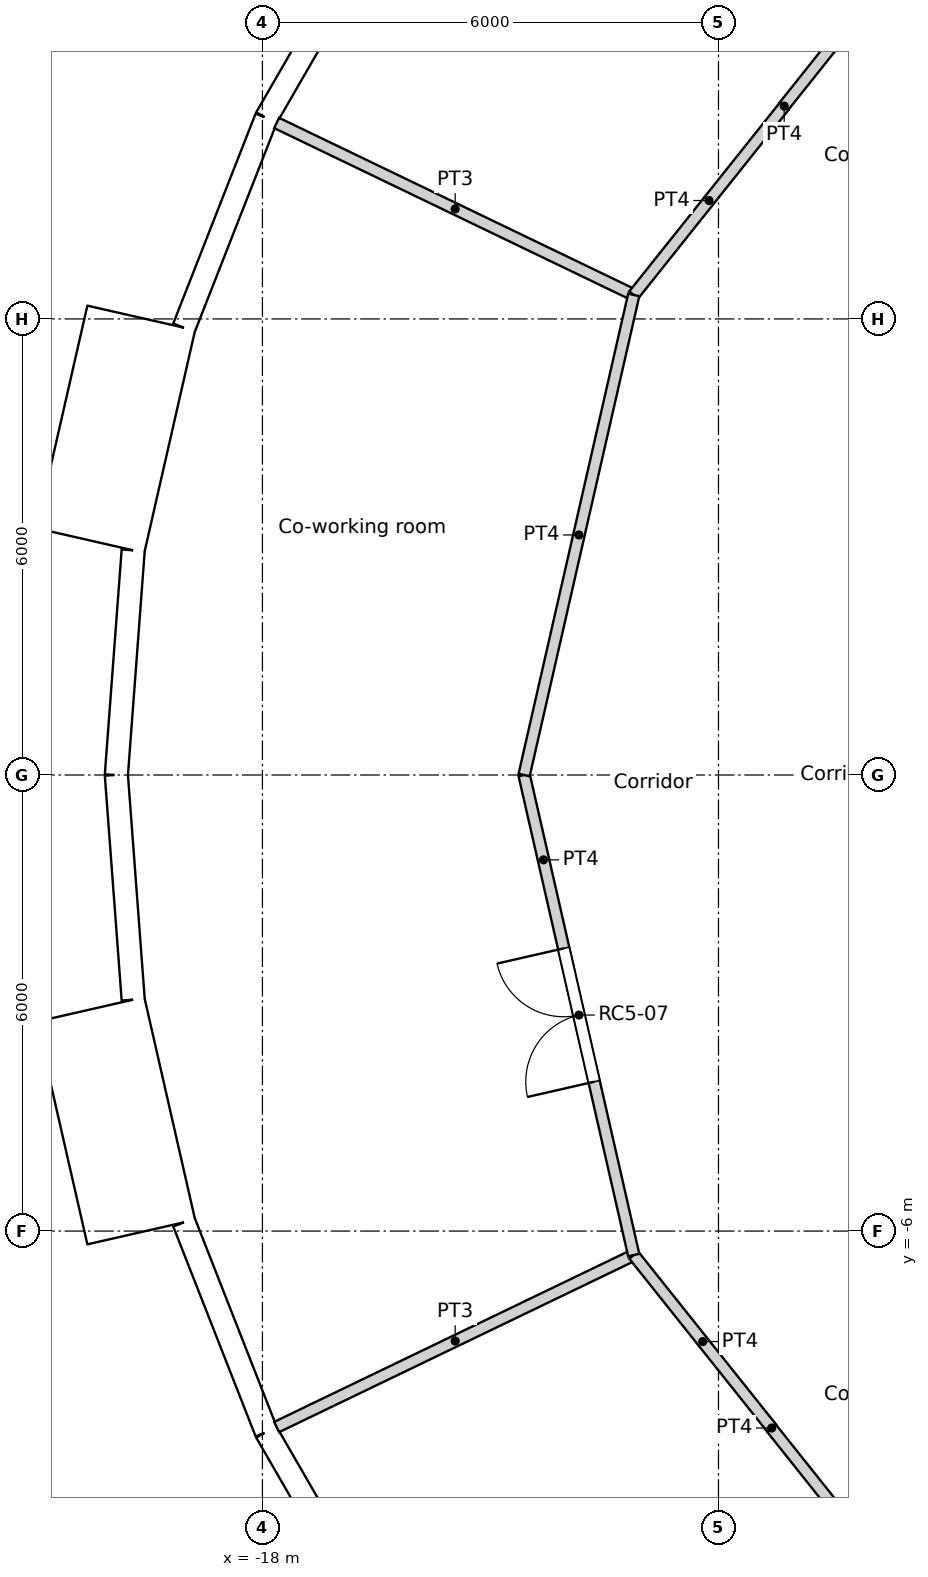
"""IFC4 building model, lengths in metres.
Left out: names, types, materials, properties, quantities, classifications, styles, units other than length and angle.
Written with IfcOpenShell. Run it as: python <this file> out.ifc"""

import sys

from ifc_helpers import new_model, si_unit, direction, frame, frame_2d, origin, origin_2d, place, context, subcontext, project, spatial, rectangle, circle, extrude, element, fill, save


model = new_model("IFC4")
c1 = context("Model", 3, precision=1e-05, world=origin(), true_north=direction((0.0, 1.0)))
c2 = subcontext(c1, "Body", "Model", "MODEL_VIEW")
j1 = project(units=[si_unit("LENGTHUNIT", "METRE"), si_unit("PLANEANGLEUNIT", "RADIAN")], contexts=[c1])
p1 = place(None, origin())
s1 = spatial("IfcSite", under=j1, at=p1, CompositionType="ELEMENT")
p2 = place(p1, origin())
s2 = spatial("IfcBuilding", under=s1, at=p2, CompositionType="ELEMENT")
p3 = place(p2, frame((0.0, 0.0, 270.6)))
s3 = spatial("IfcBuildingStorey", under=s2, at=p3, CompositionType="ELEMENT", Elevation=270.6)
for number, where, z_axis, x_axis in (
    (1, (-16.958, 8.167, 0.0), (0.0, 0.0, 1.0), (1.0, 0.0, 0.0)),
    (2, (-18.612, 2.805, 0.0), (0.0, 0.0, 1.0), (1.0, 0.0, 0.0)),
    (3, (-18.612, -2.805, 0.0), (0.0, 0.0, 1.0), (1.0, 0.0, 0.0)),
    (4, (-16.958, -8.167, 0.0), (0.0, 0.0, 1.0), (1.0, 0.0, 0.0)),
):
    element("IfcColumn", number, at=place(p3, frame(where, z_axis=z_axis, x_axis=x_axis)), inside=s3, PredefinedType="COLUMN", context=c2, shape_type="SweptSolid", body=[
        extrude(circle(Radius=0.55, at=origin_2d()), origin(), (0.0, 0.0, 1.0), 3.6),
    ])
p4 = place(p3, frame((-16.468, 11.209, 0.0), z_axis=(0.0, 0.0, 1.0), x_axis=(-0.500012570604, -0.866018146021, 0.0)))
e5 = element("IfcWall", 5, at=p4, inside=s3, PredefinedType="SOLIDWALL", context=c2, shape_type="SweptSolid", body=[
    extrude(rectangle(XDim=2.962, YDim=0.3, at=frame_2d((1.481, 0.0))), origin(), (0.0, 0.0, 1.0), 3.25),
])
p5 = place(p4, frame((1.481, 0.0, 1.55)))
e6 = element("IfcOpeningElement", 6, at=p5, cuts=e5, PredefinedType="OPENING", context=c2, shape_type="SweptSolid", body=[
    extrude(circle(Radius=0.9, at=origin_2d()), frame((0.0, 0.16, 0.0), z_axis=(0.0, -1.0, 0.0), x_axis=(1.0, 0.0, 0.0)), (0.0, 0.0, 1.0), 0.32),
])
p6 = place(p3, frame((-17.949, 8.644, 0.0), z_axis=(0.0, 0.0, 1.0), x_axis=(-0.365343821297, -0.930872650925, 0.0)))
e7 = element("IfcWall", 7, at=p6, inside=s3, PredefinedType="SOLIDWALL", context=c2, shape_type="SweptSolid", body=[
    extrude(rectangle(XDim=2.962, YDim=0.3, at=frame_2d((1.481, 0.0))), origin(), (0.0, 0.0, 1.0), 3.25),
])
p7 = place(p6, frame((1.481, 0.0, 1.55)))
e8 = element("IfcOpeningElement", 8, at=p7, cuts=e7, PredefinedType="OPENING", context=c2, shape_type="SweptSolid", body=[
    extrude(circle(Radius=0.9, at=origin_2d()), frame((0.0, 0.16, 0.0), z_axis=(0.0, -1.0, 0.0), x_axis=(1.0, 0.0, 0.0)), (0.0, 0.0, 1.0), 0.32),
])
p8 = place(p3, frame((-19.595, 6.011, -0.35), z_axis=(0.0, 0.0, 1.0), x_axis=(-0.222570682856, -0.974916555985, 0.0)))
e9 = element("IfcWall", 9, at=p8, inside=s3, PredefinedType="ELEMENTEDWALL", context=c2, shape_type="SweptSolid", body=[
    extrude(rectangle(XDim=3.0, YDim=1.45, at=frame_2d((1.5, 0.0))), origin(), (0.0, 0.0, 1.0), 3.6),
])
p9 = place(p8, frame((1.5, 0.0, 1.9)))
e10 = element("IfcOpeningElement", 10, at=p9, cuts=e9, PredefinedType="OPENING", context=c2, shape_type="SweptSolid", body=[
    extrude(circle(Radius=0.9, at=origin_2d()), frame((0.0, 0.735, 0.0), z_axis=(0.0, -1.0, 0.0), x_axis=(1.0, 0.0, 0.0)), (0.0, 0.0, 1.0), 1.47),
])
p10 = place(p3, frame((-19.7, 2.954, 0.0), z_axis=(0.0, 0.0, 1.0), x_axis=(-0.074755115547, -0.997201921729, 0.0)))
e11 = element("IfcWall", 11, at=p10, inside=s3, PredefinedType="SOLIDWALL", context=c2, shape_type="SweptSolid", body=[
    extrude(rectangle(XDim=2.962, YDim=0.3, at=frame_2d((1.481, 0.0))), origin(), (0.0, 0.0, 1.0), 3.25),
])
p11 = place(p10, frame((1.481, 0.0, 1.55)))
e12 = element("IfcOpeningElement", 12, at=p11, cuts=e11, PredefinedType="OPENING", context=c2, shape_type="SweptSolid", body=[
    extrude(circle(Radius=0.9, at=origin_2d()), frame((0.0, 0.16, 0.0), z_axis=(0.0, -1.0, 0.0), x_axis=(1.0, 0.0, 0.0)), (0.0, 0.0, 1.0), 0.32),
])
p12 = place(p3, frame((-19.922, 0.0, 0.0), z_axis=(0.0, 0.0, 1.0), x_axis=(0.074755115547, -0.997201921729, 0.0)))
e13 = element("IfcWall", 13, at=p12, inside=s3, PredefinedType="SOLIDWALL", context=c2, shape_type="SweptSolid", body=[
    extrude(rectangle(XDim=2.962, YDim=0.3, at=frame_2d((1.481, 0.0))), origin(), (0.0, 0.0, 1.0), 3.25),
])
p13 = place(p12, frame((1.481, 0.0, 1.55)))
e14 = element("IfcOpeningElement", 14, at=p13, cuts=e13, PredefinedType="OPENING", context=c2, shape_type="SweptSolid", body=[
    extrude(circle(Radius=0.9, at=origin_2d()), frame((0.0, 0.16, 0.0), z_axis=(0.0, -1.0, 0.0), x_axis=(1.0, 0.0, 0.0)), (0.0, 0.0, 1.0), 0.32),
])
p14 = place(p3, frame((-20.262, -3.086, -0.35), z_axis=(0.0, 0.0, 1.0), x_axis=(0.222570682856, -0.974916555985, 0.0)))
e15 = element("IfcWall", 15, at=p14, inside=s3, PredefinedType="ELEMENTEDWALL", context=c2, shape_type="SweptSolid", body=[
    extrude(rectangle(XDim=3.0, YDim=1.45, at=frame_2d((1.5, 0.0))), origin(), (0.0, 0.0, 1.0), 3.6),
])
p15 = place(p14, frame((1.5, 0.0, 1.9)))
e16 = element("IfcOpeningElement", 16, at=p15, cuts=e15, PredefinedType="OPENING", context=c2, shape_type="SweptSolid", body=[
    extrude(circle(Radius=0.9, at=origin_2d()), frame((0.0, 0.735, 0.0), z_axis=(0.0, -1.0, 0.0), x_axis=(1.0, 0.0, 0.0)), (0.0, 0.0, 1.0), 1.47),
])
p16 = place(p3, frame((-19.031, -5.886, 0.0), z_axis=(0.0, 0.0, 1.0), x_axis=(0.365343821297, -0.930872650925, 0.0)))
e17 = element("IfcWall", 17, at=p16, inside=s3, PredefinedType="SOLIDWALL", context=c2, shape_type="SweptSolid", body=[
    extrude(rectangle(XDim=2.962, YDim=0.3, at=frame_2d((1.481, 0.0))), origin(), (0.0, 0.0, 1.0), 3.25),
])
p17 = place(p16, frame((1.481, 0.0, 1.55)))
e18 = element("IfcOpeningElement", 18, at=p17, cuts=e17, PredefinedType="OPENING", context=c2, shape_type="SweptSolid", body=[
    extrude(circle(Radius=0.9, at=origin_2d()), frame((0.0, 0.16, 0.0), z_axis=(0.0, -1.0, 0.0), x_axis=(1.0, 0.0, 0.0)), (0.0, 0.0, 1.0), 0.32),
])
p18 = place(p3, frame((-17.949, -8.644, 0.0), z_axis=(0.0, 0.0, 1.0), x_axis=(0.500012570604, -0.866018146021, 0.0)))
e19 = element("IfcWall", 19, at=p18, inside=s3, PredefinedType="SOLIDWALL", context=c2, shape_type="SweptSolid", body=[
    extrude(rectangle(XDim=2.962, YDim=0.3, at=frame_2d((1.481, 0.0))), origin(), (0.0, 0.0, 1.0), 3.25),
])
p19 = place(p18, frame((1.481, 0.0, 1.55)))
e20 = element("IfcOpeningElement", 20, at=p19, cuts=e19, PredefinedType="OPENING", context=c2, shape_type="SweptSolid", body=[
    extrude(circle(Radius=0.9, at=origin_2d()), frame((0.0, 0.16, 0.0), z_axis=(0.0, -1.0, 0.0), x_axis=(1.0, 0.0, 0.0)), (0.0, 0.0, 1.0), 0.32),
])
p20 = place(p3, frame((-11.134, 8.8, 0.0), z_axis=(0.0, 0.0, 1.0), x_axis=(-1.0, 0.0, 0.0)))
e21 = element("IfcWall", 21, at=p20, inside=s3, PredefinedType="PARTITIONING", context=c2, shape_type="SweptSolid", body=[
    extrude(rectangle(XDim=0.003, YDim=0.15, at=frame_2d((0.001, 0.0))), origin(), (0.0, 0.0, 1.0), 3.1),
])
p21 = place(p3, frame((-11.136, 8.802, 0.0), z_axis=(0.0, 0.0, 1.0), x_axis=(0.623151397235, 0.782101231379, 0.0)))
e22 = element("IfcWall", 22, at=p21, inside=s3, PredefinedType="PARTITIONING", context=c2, shape_type="SweptSolid", body=[
    extrude(rectangle(XDim=3.301, YDim=0.15, at=frame_2d((1.65, 0.0))), origin(), (0.0, 0.0, 1.0), 3.1),
])
p22 = place(p3, frame((-11.3, -8.596, 0.0), z_axis=(0.0, 0.0, 1.0), x_axis=(0.623165080354, -0.782090328944, 0.0)))
e23 = element("IfcWall", 23, at=p22, inside=s3, PredefinedType="PARTITIONING", context=c2, shape_type="SweptSolid", body=[
    extrude(rectangle(XDim=3.564, YDim=0.15, at=frame_2d((1.782, 0.0))), origin(), (0.0, 0.0, 1.0), 3.1),
])
p23 = place(p3, frame((-11.3, -8.596, 0.0), z_axis=(0.0, 0.0, 1.0), x_axis=(0.0, 1.0, 0.0)))
e24 = element("IfcWall", 24, at=p23, inside=s3, PredefinedType="PARTITIONING", context=c2, shape_type="SweptSolid", body=[
    extrude(rectangle(XDim=0.01, YDim=0.15, at=frame_2d((0.005, 0.0))), origin(), (0.0, 0.0, 1.0), 3.1),
])
p24 = place(p3, frame((-13.115, 6.316, 0.0), z_axis=(0.0, 0.0, 1.0), x_axis=(0.623476099415, 0.781842409606, 0.0)))
e25 = element("IfcWall", 25, at=p24, inside=s3, PredefinedType="PARTITIONING", context=c2, shape_type="SweptSolid", body=[
    extrude(rectangle(XDim=3.177, YDim=0.15, at=frame_2d((1.589, 0.0))), origin(), (0.0, 0.0, 1.0), 3.1),
])
p25 = place(p3, frame((-14.557, 0.0, 0.0), z_axis=(0.0, 0.0, 1.0), x_axis=(0.222568978642, -0.97491694505, 0.0)))
e26 = element("IfcWall", 26, at=p25, inside=s3, PredefinedType="PARTITIONING", context=c2, shape_type="SweptSolid", body=[
    extrude(rectangle(XDim=6.479, YDim=0.15, at=frame_2d((3.239, 0.0))), origin(), (0.0, 0.0, 1.0), 3.1),
])
p26 = place(p25, frame((2.34, 0.0, 0.0)))
e27 = element("IfcOpeningElement", 27, at=p26, cuts=e26, PredefinedType="OPENING", context=c2, shape_type="SweptSolid", body=[
    extrude(rectangle(XDim=1.8, YDim=2.1, at=frame_2d((0.9, 1.05))), frame((0.0, 0.075, 0.0), z_axis=(0.0, -1.0, 0.0), x_axis=(1.0, 0.0, 0.0)), (0.0, 0.0, 1.0), 0.15),
])
p27 = place(p3, frame((-14.557, 0.0, 0.0), z_axis=(0.0, 0.0, 1.0), x_axis=(0.222568978642, 0.97491694505, 0.0)))
e28 = element("IfcWall", 28, at=p27, inside=s3, PredefinedType="PARTITIONING", context=c2, shape_type="SweptSolid", body=[
    extrude(rectangle(XDim=6.479, YDim=0.15, at=frame_2d((3.239, 0.0))), origin(), (0.0, 0.0, 1.0), 3.1),
])
p28 = place(p3, frame((-13.115, -6.316, 0.0), z_axis=(0.0, 0.0, 1.0), x_axis=(0.623446514299, -0.781866001185, 0.0)))
e29 = element("IfcWall", 29, at=p28, inside=s3, PredefinedType="PARTITIONING", context=c2, shape_type="SweptSolid", body=[
    extrude(rectangle(XDim=2.911, YDim=0.15, at=frame_2d((1.456, 0.0))), origin(), (0.0, 0.0, 1.0), 3.1),
])
for number, where, z_axis, x_axis in (
    (30, (-17.813, 8.578, 0.0), (0.0, 0.0, 1.0), (0.901, -0.434, 0.0)),
    (31, (-17.813, -8.578, 0.0), (0.0, 0.0, 1.0), (0.901, 0.434, 0.0)),
):
    element("IfcWall", number, at=place(p3, frame(where, z_axis=z_axis, x_axis=x_axis)), inside=s3, PredefinedType="PARTITIONING", context=c2, shape_type="SweptSolid", body=[
        extrude(rectangle(XDim=5.214, YDim=0.15, at=frame_2d((2.607, 0.0))), origin(), (0.0, 0.0, 1.0), 3.1),
    ])
p29 = place(p5, origin())
e32 = element("IfcWindow", 32, at=p29, inside=s3, PartitioningType="SINGLE_PANEL", PredefinedType="WINDOW", context=c2, shape_type="SweptSolid", body=[
    extrude(circle(Radius=0.9, at=origin_2d()), frame((0.0, 0.12, 0.0), z_axis=(0.0, -1.0, 0.0), x_axis=(1.0, 0.0, 0.0)), (0.0, 0.0, 1.0), 0.1),
])
fill(e6, e32)
p30 = place(p7, origin())
e33 = element("IfcWindow", 33, at=p30, inside=s3, PartitioningType="SINGLE_PANEL", PredefinedType="WINDOW", context=c2, shape_type="SweptSolid", body=[
    extrude(circle(Radius=0.9, at=origin_2d()), frame((0.0, 0.12, 0.0), z_axis=(0.0, -1.0, 0.0), x_axis=(1.0, 0.0, 0.0)), (0.0, 0.0, 1.0), 0.1),
])
fill(e8, e33)
p31 = place(p9, origin())
e34 = element("IfcWindow", 34, at=p31, inside=s3, PartitioningType="SINGLE_PANEL", PredefinedType="WINDOW", context=c2, shape_type="SweptSolid", body=[
    extrude(circle(Radius=0.9, at=origin_2d()), frame((0.0, 0.695, 0.0), z_axis=(0.0, -1.0, 0.0), x_axis=(1.0, 0.0, 0.0)), (0.0, 0.0, 1.0), 0.1),
])
fill(e10, e34)
p32 = place(p11, origin())
e35 = element("IfcWindow", 35, at=p32, inside=s3, PartitioningType="SINGLE_PANEL", PredefinedType="WINDOW", context=c2, shape_type="SweptSolid", body=[
    extrude(circle(Radius=0.9, at=origin_2d()), frame((0.0, 0.12, 0.0), z_axis=(0.0, -1.0, 0.0), x_axis=(1.0, 0.0, 0.0)), (0.0, 0.0, 1.0), 0.1),
])
fill(e12, e35)
p33 = place(p13, origin())
e36 = element("IfcWindow", 36, at=p33, inside=s3, PartitioningType="SINGLE_PANEL", PredefinedType="WINDOW", context=c2, shape_type="SweptSolid", body=[
    extrude(circle(Radius=0.9, at=origin_2d()), frame((0.0, 0.12, 0.0), z_axis=(0.0, -1.0, 0.0), x_axis=(1.0, 0.0, 0.0)), (0.0, 0.0, 1.0), 0.1),
])
fill(e14, e36)
p34 = place(p15, origin())
e37 = element("IfcWindow", 37, at=p34, inside=s3, PartitioningType="SINGLE_PANEL", PredefinedType="WINDOW", context=c2, shape_type="SweptSolid", body=[
    extrude(circle(Radius=0.9, at=origin_2d()), frame((0.0, 0.695, 0.0), z_axis=(0.0, -1.0, 0.0), x_axis=(1.0, 0.0, 0.0)), (0.0, 0.0, 1.0), 0.1),
])
fill(e16, e37)
p35 = place(p17, origin())
e38 = element("IfcWindow", 38, at=p35, inside=s3, PartitioningType="SINGLE_PANEL", PredefinedType="WINDOW", context=c2, shape_type="SweptSolid", body=[
    extrude(circle(Radius=0.9, at=origin_2d()), frame((0.0, 0.12, 0.0), z_axis=(0.0, -1.0, 0.0), x_axis=(1.0, 0.0, 0.0)), (0.0, 0.0, 1.0), 0.1),
])
fill(e18, e38)
p36 = place(p19, origin())
e39 = element("IfcWindow", 39, at=p36, inside=s3, PartitioningType="SINGLE_PANEL", PredefinedType="WINDOW", context=c2, shape_type="SweptSolid", body=[
    extrude(circle(Radius=0.9, at=origin_2d()), frame((0.0, 0.12, 0.0), z_axis=(0.0, -1.0, 0.0), x_axis=(1.0, 0.0, 0.0)), (0.0, 0.0, 1.0), 0.1),
])
fill(e20, e39)
p37 = place(p26, origin())
e40 = element("IfcDoor", 40, at=p37, inside=s3, OperationType="DOUBLE_DOOR_SINGLE_SWING", PredefinedType="DOOR", context=c2, shape_type="SweptSolid", body=[
    extrude(rectangle(XDim=1.8, YDim=2.1, at=frame_2d((0.9, 1.05))), frame((0.0, 0.025, 0.0), z_axis=(0.0, -1.0, 0.0), x_axis=(1.0, 0.0, 0.0)), (0.0, 0.0, 1.0), 0.05),
])
fill(e27, e40)
save(model, sys.argv[1])
